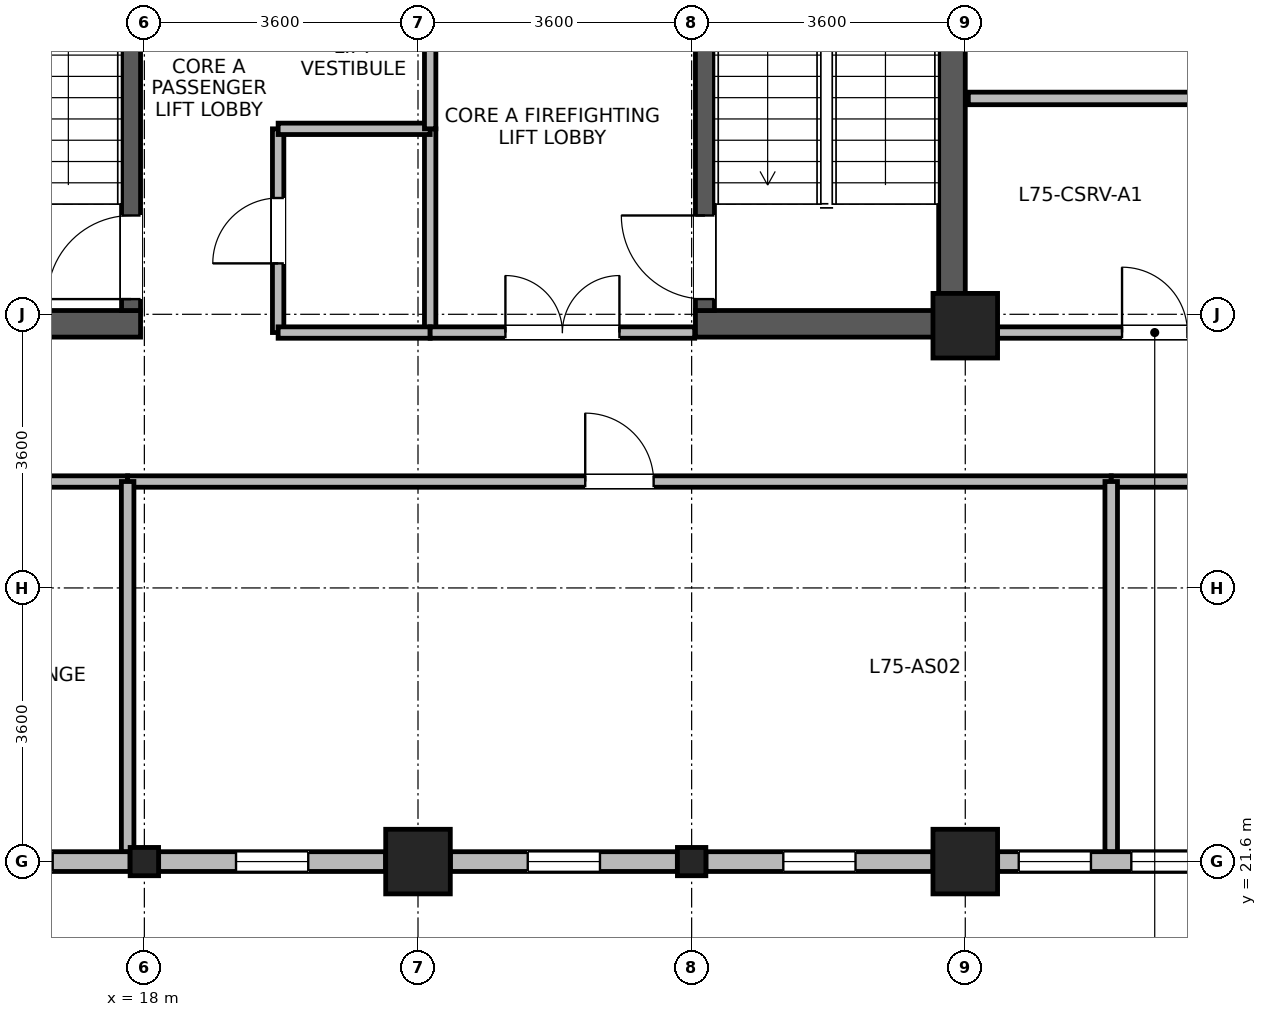
"""IFC4 building model, lengths in metres.
Left out: names, types, materials, properties, quantities, classifications, styles, units other than length and angle.
Written with IfcOpenShell. Run it as: python <this file> out.ifc"""

import sys

from ifc_helpers import new_model, si_unit, direction, frame, frame_2d, origin, origin_2d, place, context, subcontext, project, spatial, rectangle, i_section, extrude, source, transform, mapped, element, fill, save


model = new_model("IFC4")
c1 = context("Model", 3, precision=1e-05, world=origin(), true_north=direction((0.0, 1.0)))
c2 = subcontext(c1, "Body", "Model", "MODEL_VIEW")
j1 = project(units=[si_unit("LENGTHUNIT", "METRE"), si_unit("PLANEANGLEUNIT", "RADIAN")], contexts=[c1])
p1 = place(None, origin())
s1 = spatial("IfcSite", under=j1, at=p1, CompositionType="ELEMENT")
p2 = place(p1, origin())
s2 = spatial("IfcBuilding", under=s1, at=p2, CompositionType="ELEMENT")
p3 = place(p2, frame((0.0, 0.0, 290.6)))
s3 = spatial("IfcBuildingStorey", under=s2, at=p3, CompositionType="ELEMENT", Elevation=290.6)
p4 = place(p3, frame((28.625, 28.5, 0.0), z_axis=(0.0, 0.0, 1.0), x_axis=(0.0, 1.0, 0.0)))
e1 = element("IfcWall", 1, at=p4, inside=s3, PredefinedType="SHEAR", context=c2, shape_type="SweptSolid", body=[
    extrude(rectangle(XDim=7.7, YDim=0.35, at=frame_2d((3.85, 0.0))), origin(), (0.0, 0.0, 1.0), 3.475),
])
for number, where, z_axis, x_axis in (
    (2, (14.75, 28.675, 0.0), (0.0, 0.0, 1.0), (1.0, 0.0, 0.0)),
    (3, (25.25, 28.675, 0.0), (0.0, 0.0, 1.0), (1.0, 0.0, 0.0)),
):
    element("IfcWall", number, at=place(p3, frame(where, z_axis=z_axis, x_axis=x_axis)), inside=s3, PredefinedType="SHEAR", context=c2, shape_type="SweptSolid", body=[
        extrude(rectangle(XDim=3.2, YDim=0.35, at=frame_2d((1.6, 0.0))), origin(), (0.0, 0.0, 1.0), 3.475),
    ])
p5 = place(p3, frame((17.825, 28.85, 0.0), z_axis=(0.0, 0.0, 1.0), x_axis=(0.0, 1.0, 0.0)))
e4 = element("IfcWall", 4, at=p5, inside=s3, PredefinedType="SHEAR", context=c2, shape_type="SweptSolid", body=[
    extrude(rectangle(XDim=7.0, YDim=0.25, at=frame_2d((3.5, 0.0))), origin(), (0.0, 0.0, 1.0), 3.475),
])
p6 = place(p5, frame((0.15, 0.0, 0.0)))
e5 = element("IfcOpeningElement", 5, at=p6, cuts=e4, PredefinedType="OPENING", context=c2, shape_type="SweptSolid", body=[
    extrude(rectangle(XDim=1.1, YDim=2.08, at=frame_2d((0.55, 1.04))), frame((0.0, 0.135, 0.0), z_axis=(0.0, -1.0, 0.0), x_axis=(1.0, 0.0, 0.0)), (0.0, 0.0, 1.0), 0.27),
])
p7 = place(p3, frame((25.375, 28.85, 0.0), z_axis=(0.0, 0.0, 1.0), x_axis=(0.0, 1.0, 0.0)))
e6 = element("IfcWall", 6, at=p7, inside=s3, PredefinedType="SHEAR", context=c2, shape_type="SweptSolid", body=[
    extrude(rectangle(XDim=7.0, YDim=0.25, at=frame_2d((3.5, 0.0))), origin(), (0.0, 0.0, 1.0), 3.475),
])
p8 = place(p7, frame((0.15, 0.0, 0.0)))
e7 = element("IfcOpeningElement", 7, at=p8, cuts=e6, PredefinedType="OPENING", context=c2, shape_type="SweptSolid", body=[
    extrude(rectangle(XDim=1.1, YDim=2.08, at=frame_2d((0.55, 1.04))), frame((0.0, 0.135, 0.0), z_axis=(0.0, -1.0, 0.0), x_axis=(1.0, 0.0, 0.0)), (0.0, 0.0, 1.0), 0.27),
])
m1 = source(origin(), c2, "Body", "SweptSolid", [
    extrude(rectangle(XDim=0.85, YDim=0.85, at=origin_2d()), origin(), (0.0, 0.0, 1.0), 3.7),
])
for number, where, z_axis, x_axis in (
    (8, (21.6, 21.6, 0.0), (0.0, 0.0, 1.0), (1.0, 0.0, 0.0)),
    (9, (28.8, 21.6, 0.0), (0.0, 0.0, 1.0), (1.0, 0.0, 0.0)),
    (10, (28.8, 28.65, 0.0), (0.0, 0.0, 1.0), (1.0, 0.0, 0.0)),
):
    element("IfcColumn", number, at=place(p3, frame(where, z_axis=z_axis, x_axis=x_axis)), inside=s3, PredefinedType="COLUMN", context=c2, shape_type="MappedRepresentation", body=[
        mapped(m1, transform((0.0, 0.0, 0.0), x_axis=(1.0, 0.0, 0.0), y_axis=(0.0, 1.0, 0.0), z_axis=(0.0, 0.0, 1.0), scale=1.0)),
    ])
m2 = source(origin(), c2, "Body", "SweptSolid", [
    extrude(i_section(OverallWidth=0.374, OverallDepth=0.372, WebThickness=0.015, FlangeThickness=0.026, FilletRadius=0.015, at=origin_2d()), origin(), (0.0, 0.0, 1.0), 3.7),
])
for number, where, z_axis, x_axis in (
    (11, (18.0, 21.6, 0.0), (0.0, 0.0, 1.0), (1.0, 0.0, 0.0)),
    (12, (25.2, 21.6, 0.0), (0.0, 0.0, 1.0), (1.0, 0.0, 0.0)),
):
    element("IfcColumn", number, at=place(p3, frame(where, z_axis=z_axis, x_axis=x_axis)), inside=s3, PredefinedType="COLUMN", context=c2, shape_type="MappedRepresentation", body=[
        mapped(m2, transform((0.0, 0.0, 0.0), x_axis=(1.0, 0.0, 0.0), y_axis=(0.0, 1.0, 0.0), z_axis=(0.0, 0.0, 1.0), scale=1.0)),
    ])
p9 = place(p3, frame((17.812, 21.6, 0.0), z_axis=(0.0, 0.0, 1.0), x_axis=(-1.0, 0.0, 0.0)))
e13 = element("IfcWall", 13, at=p9, inside=s3, PredefinedType="STANDARD", context=c2, shape_type="SweptSolid", body=[
    extrude(rectangle(XDim=2.986, YDim=0.26, at=frame_2d((1.493, 0.0))), origin(), (0.0, 0.0, 1.0), 3.055),
])
p10 = place(p9, frame((1.018, 0.0, 0.85)))
e14 = element("IfcOpeningElement", 14, at=p10, cuts=e13, PredefinedType="OPENING", context=c2, shape_type="SweptSolid", body=[
    extrude(rectangle(XDim=0.95, YDim=1.75, at=frame_2d((0.475, 0.875))), frame((0.0, 0.14, 0.0), z_axis=(0.0, -1.0, 0.0), x_axis=(1.0, 0.0, 0.0)), (0.0, 0.0, 1.0), 0.28),
])
p11 = place(p3, frame((21.174, 21.6, 0.0), z_axis=(0.0, 0.0, 1.0), x_axis=(-1.0, 0.0, 0.0)))
e15 = element("IfcWall", 15, at=p11, inside=s3, PredefinedType="STANDARD", context=c2, shape_type="SweptSolid", body=[
    extrude(rectangle(XDim=2.986, YDim=0.26, at=frame_2d((1.493, 0.0))), origin(), (0.0, 0.0, 1.0), 3.055),
])
p12 = place(p11, frame((1.018, 0.0, 0.85)))
e16 = element("IfcOpeningElement", 16, at=p12, cuts=e15, PredefinedType="OPENING", context=c2, shape_type="SweptSolid", body=[
    extrude(rectangle(XDim=0.95, YDim=1.75, at=frame_2d((0.475, 0.875))), frame((0.0, 0.14, 0.0), z_axis=(0.0, -1.0, 0.0), x_axis=(1.0, 0.0, 0.0)), (0.0, 0.0, 1.0), 0.28),
])
p13 = place(p3, frame((25.012, 21.6, 0.0), z_axis=(0.0, 0.0, 1.0), x_axis=(-1.0, 0.0, 0.0)))
e17 = element("IfcWall", 17, at=p13, inside=s3, PredefinedType="STANDARD", context=c2, shape_type="SweptSolid", body=[
    extrude(rectangle(XDim=2.986, YDim=0.26, at=frame_2d((1.493, 0.0))), origin(), (0.0, 0.0, 1.0), 3.055),
])
p14 = place(p13, frame((1.018, 0.0, 0.85)))
e18 = element("IfcOpeningElement", 18, at=p14, cuts=e17, PredefinedType="OPENING", context=c2, shape_type="SweptSolid", body=[
    extrude(rectangle(XDim=0.95, YDim=1.75, at=frame_2d((0.475, 0.875))), frame((0.0, 0.14, 0.0), z_axis=(0.0, -1.0, 0.0), x_axis=(1.0, 0.0, 0.0)), (0.0, 0.0, 1.0), 0.28),
])
p15 = place(p3, frame((28.374, 21.6, 0.0), z_axis=(0.0, 0.0, 1.0), x_axis=(-1.0, 0.0, 0.0)))
e19 = element("IfcWall", 19, at=p15, inside=s3, PredefinedType="STANDARD", context=c2, shape_type="SweptSolid", body=[
    extrude(rectangle(XDim=2.986, YDim=0.26, at=frame_2d((1.493, 0.0))), origin(), (0.0, 0.0, 1.0), 3.055),
])
p16 = place(p15, frame((1.018, 0.0, 0.85)))
e20 = element("IfcOpeningElement", 20, at=p16, cuts=e19, PredefinedType="OPENING", context=c2, shape_type="SweptSolid", body=[
    extrude(rectangle(XDim=0.95, YDim=1.75, at=frame_2d((0.475, 0.875))), frame((0.0, 0.14, 0.0), z_axis=(0.0, -1.0, 0.0), x_axis=(1.0, 0.0, 0.0)), (0.0, 0.0, 1.0), 0.28),
])
p17 = place(p3, frame((32.212, 21.6, 0.0), z_axis=(0.0, 0.0, 1.0), x_axis=(-1.0, 0.0, 0.0)))
e21 = element("IfcWall", 21, at=p17, inside=s3, PredefinedType="STANDARD", context=c2, shape_type="SweptSolid", body=[
    extrude(rectangle(XDim=2.986, YDim=0.26, at=frame_2d((1.493, 0.0))), origin(), (0.0, 0.0, 1.0), 3.055),
])
p18 = place(p17, frame((0.278, 0.0, 0.85)))
e22 = element("IfcOpeningElement", 22, at=p18, cuts=e21, PredefinedType="OPENING", context=c2, shape_type="SweptSolid", body=[
    extrude(rectangle(XDim=0.95, YDim=1.75, at=frame_2d((0.475, 0.875))), frame((0.0, 0.14, 0.0), z_axis=(0.0, -1.0, 0.0), x_axis=(1.0, 0.0, 0.0)), (0.0, 0.0, 1.0), 0.28),
])
p19 = place(p17, frame((1.759, 0.0, 0.85)))
e23 = element("IfcOpeningElement", 23, at=p19, cuts=e21, PredefinedType="OPENING", context=c2, shape_type="SweptSolid", body=[
    extrude(rectangle(XDim=0.95, YDim=1.75, at=frame_2d((0.475, 0.875))), frame((0.0, 0.14, 0.0), z_axis=(0.0, -1.0, 0.0), x_axis=(1.0, 0.0, 0.0)), (0.0, 0.0, 1.0), 0.28),
])
p20 = place(p3, frame((3.732, 26.6, 0.0), z_axis=(0.0, 0.0, 1.0), x_axis=(1.0, 0.0, 0.0)))
e24 = element("IfcWall", 24, at=p20, inside=s3, PredefinedType="PARTITIONING", context=c2, shape_type="SweptSolid", body=[
    extrude(rectangle(XDim=14.048, YDim=0.15, at=frame_2d((7.024, 0.0))), origin(), (0.0, 0.0, 1.0), 3.455),
])
p21 = place(p20, frame((6.374, 0.0, 0.0)))
e25 = element("IfcOpeningElement", 25, at=p21, cuts=e24, PredefinedType="OPENING", context=c2, shape_type="SweptSolid", body=[
    extrude(rectangle(XDim=1.3, YDim=2.12, at=frame_2d((0.65, 1.06))), frame((0.0, 0.085, 0.0), z_axis=(0.0, -1.0, 0.0), x_axis=(1.0, 0.0, 0.0)), (0.0, 0.0, 1.0), 0.17),
])
p22 = place(p3, frame((17.78, 26.6, 0.0), z_axis=(0.0, 0.0, 1.0), x_axis=(1.0, 0.0, 0.0)))
e26 = element("IfcWall", 26, at=p22, inside=s3, PredefinedType="PARTITIONING", context=c2, shape_type="SweptSolid", body=[
    extrude(rectangle(XDim=12.94, YDim=0.15, at=frame_2d((6.47, 0.0))), origin(), (0.0, 0.0, 1.0), 3.455),
])
p23 = place(p22, frame((6.02, 0.0, 0.0)))
e27 = element("IfcOpeningElement", 27, at=p23, cuts=e26, PredefinedType="OPENING", context=c2, shape_type="SweptSolid", body=[
    extrude(rectangle(XDim=0.9, YDim=2.08, at=frame_2d((0.45, 1.04))), frame((0.0, 0.085, 0.0), z_axis=(0.0, -1.0, 0.0), x_axis=(1.0, 0.0, 0.0)), (0.0, 0.0, 1.0), 0.17),
])
p24 = place(p3, frame((30.72, 26.6, 0.0), z_axis=(0.0, 0.0, 1.0), x_axis=(1.0, 0.0, 0.0)))
e28 = element("IfcWall", 28, at=p24, inside=s3, PredefinedType="PARTITIONING", context=c2, shape_type="SweptSolid", body=[
    extrude(rectangle(XDim=7.08, YDim=0.15, at=frame_2d((3.54, 0.0))), origin(), (0.0, 0.0, 1.0), 3.455),
])
p25 = place(p24, frame((3.065, 0.0, 0.0)))
e29 = element("IfcOpeningElement", 29, at=p25, cuts=e28, PredefinedType="OPENING", context=c2, shape_type="SweptSolid", body=[
    extrude(rectangle(XDim=0.95, YDim=2.1, at=frame_2d((0.475, 1.05))), frame((0.0, 0.085, 0.0), z_axis=(0.0, -1.0, 0.0), x_axis=(1.0, 0.0, 0.0)), (0.0, 0.0, 1.0), 0.17),
])
p26 = place(p3, frame((29.225, 28.56, 0.0), z_axis=(0.0, 0.0, 1.0), x_axis=(1.0, 0.0, 0.0)))
e30 = element("IfcWall", 30, at=p26, inside=s3, PredefinedType="PARTITIONING", context=c2, shape_type="SweptSolid", body=[
    extrude(rectangle(XDim=4.135, YDim=0.15, at=frame_2d((2.067, 0.0))), origin(), (0.0, 0.0, 1.0), 2.905),
])
p27 = place(p26, frame((1.637, 0.0, 0.0)))
e31 = element("IfcOpeningElement", 31, at=p27, cuts=e30, PredefinedType="OPENING", context=c2, shape_type="SweptSolid", body=[
    extrude(rectangle(XDim=0.86, YDim=2.02, at=frame_2d((0.43, 1.01))), frame((0.0, 0.085, 0.0), z_axis=(0.0, -1.0, 0.0), x_axis=(1.0, 0.0, 0.0)), (0.0, 0.0, 1.0), 0.17),
])
p28 = place(p3, frame((19.76, 28.56, 0.0), z_axis=(0.0, 0.0, 1.0), x_axis=(0.0, 1.0, 0.0)))
e32 = element("IfcWall", 32, at=p28, inside=s3, PredefinedType="PARTITIONING", context=c2, shape_type="SweptSolid", body=[
    extrude(rectangle(XDim=2.68, YDim=0.15, at=frame_2d((1.34, 0.0))), origin(), (0.0, 0.0, 1.0), 3.455),
])
p29 = place(p28, frame((0.91, 0.0, 0.0)))
e33 = element("IfcOpeningElement", 33, at=p29, cuts=e32, PredefinedType="OPENING", context=c2, shape_type="SweptSolid", body=[
    extrude(rectangle(XDim=0.86, YDim=2.02, at=frame_2d((0.43, 1.01))), frame((0.0, 0.085, 0.0), z_axis=(0.0, -1.0, 0.0), x_axis=(1.0, 0.0, 0.0)), (0.0, 0.0, 1.0), 0.17),
])
p30 = place(p3, frame((21.76, 28.56, 0.0), z_axis=(0.0, 0.0, 1.0), x_axis=(0.0, 1.0, 0.0)))
e34 = element("IfcWall", 34, at=p30, inside=s3, PredefinedType="PARTITIONING", context=c2, shape_type="SweptSolid", body=[
    extrude(rectangle(XDim=2.68, YDim=0.15, at=frame_2d((1.34, 0.0))), origin(), (0.0, 0.0, 1.0), 3.455),
])
p31 = place(p3, frame((19.76, 28.56, 0.0), z_axis=(0.0, 0.0, 1.0), x_axis=(1.0, 0.0, 0.0)))
e35 = element("IfcWall", 35, at=p31, inside=s3, PredefinedType="PARTITIONING", context=c2, shape_type="SweptSolid", body=[
    extrude(rectangle(XDim=2.0, YDim=0.15, at=frame_2d((1.0, 0.0))), origin(), (0.0, 0.0, 1.0), 2.555),
])
p32 = place(p3, frame((19.76, 31.24, 0.0), z_axis=(0.0, 0.0, 1.0), x_axis=(1.0, 0.0, 0.0)))
e36 = element("IfcWall", 36, at=p32, inside=s3, PredefinedType="PARTITIONING", context=c2, shape_type="SweptSolid", body=[
    extrude(rectangle(XDim=2.0, YDim=0.15, at=frame_2d((1.0, 0.0))), origin(), (0.0, 0.0, 1.0), 3.455),
])
for number, where, z_axis, x_axis in (
    (37, (17.78, 21.732, 0.0), (0.0, 0.0, 1.0), (0.0, 1.0, 0.0)),
    (38, (30.72, 21.732, 0.0), (0.0, 0.0, 1.0), (0.0, 1.0, 0.0)),
):
    element("IfcWall", number, at=place(p3, frame(where, z_axis=z_axis, x_axis=x_axis)), inside=s3, PredefinedType="PARTITIONING", context=c2, shape_type="SweptSolid", body=[
        extrude(rectangle(XDim=4.868, YDim=0.165, at=frame_2d((2.434, 0.0))), origin(), (0.0, 0.0, 1.0), 3.455),
    ])
p33 = place(p3, frame((28.84, 31.64, 0.0), z_axis=(0.0, 0.0, 1.0), x_axis=(1.0, 0.0, 0.0)))
e39 = element("IfcWall", 39, at=p33, inside=s3, PredefinedType="PARTITIONING", context=c2, shape_type="SweptSolid", body=[
    extrude(rectangle(XDim=4.52, YDim=0.165, at=frame_2d((2.26, 0.0))), origin(), (0.0, 0.0, 1.0), 3.455),
])
p34 = place(p3, frame((21.76, 28.56, 0.0), z_axis=(0.0, 0.0, 1.0), x_axis=(1.0, 0.0, 0.0)))
e40 = element("IfcWall", 40, at=p34, inside=s3, PredefinedType="PARTITIONING", context=c2, shape_type="SweptSolid", body=[
    extrude(rectangle(XDim=3.48, YDim=0.15, at=frame_2d((1.74, 0.0))), origin(), (0.0, 0.0, 1.0), 2.555),
])
p35 = place(p34, frame((0.99, 0.0, 0.0)))
e41 = element("IfcOpeningElement", 41, at=p35, cuts=e40, PredefinedType="OPENING", context=c2, shape_type="SweptSolid", body=[
    extrude(rectangle(XDim=1.5, YDim=2.1, at=frame_2d((0.75, 1.05))), frame((0.0, 0.085, 0.0), z_axis=(0.0, -1.0, 0.0), x_axis=(1.0, 0.0, 0.0)), (0.0, 0.0, 1.0), 0.17),
])
p36 = place(p3, frame((21.76, 31.24, 0.0), z_axis=(0.0, 0.0, 1.0), x_axis=(0.0, 1.0, 0.0)))
e42 = element("IfcWall", 42, at=p36, inside=s3, PredefinedType="PARTITIONING", context=c2, shape_type="SweptSolid", body=[
    extrude(rectangle(XDim=1.92, YDim=0.15, at=frame_2d((0.96, 0.0))), origin(), (0.0, 0.0, 1.0), 3.455),
])
p37 = place(p10, origin())
e43 = element("IfcWindow", 43, at=p37, inside=s3, PartitioningType="SINGLE_PANEL", PredefinedType="WINDOW", context=c2, shape_type="SweptSolid", body=[
    extrude(rectangle(XDim=0.95, YDim=1.75, at=frame_2d((0.475, 0.875))), frame((0.0, 0.03, 0.0), z_axis=(0.0, -1.0, 0.0), x_axis=(1.0, 0.0, 0.0)), (0.0, 0.0, 1.0), 0.06),
])
fill(e14, e43)
p38 = place(p12, origin())
e44 = element("IfcWindow", 44, at=p38, inside=s3, PartitioningType="SINGLE_PANEL", PredefinedType="WINDOW", context=c2, shape_type="SweptSolid", body=[
    extrude(rectangle(XDim=0.95, YDim=1.75, at=frame_2d((0.475, 0.875))), frame((0.0, 0.03, 0.0), z_axis=(0.0, -1.0, 0.0), x_axis=(1.0, 0.0, 0.0)), (0.0, 0.0, 1.0), 0.06),
])
fill(e16, e44)
p39 = place(p14, origin())
e45 = element("IfcWindow", 45, at=p39, inside=s3, PartitioningType="SINGLE_PANEL", PredefinedType="WINDOW", context=c2, shape_type="SweptSolid", body=[
    extrude(rectangle(XDim=0.95, YDim=1.75, at=frame_2d((0.475, 0.875))), frame((0.0, 0.03, 0.0), z_axis=(0.0, -1.0, 0.0), x_axis=(1.0, 0.0, 0.0)), (0.0, 0.0, 1.0), 0.06),
])
fill(e18, e45)
p40 = place(p16, origin())
e46 = element("IfcWindow", 46, at=p40, inside=s3, PartitioningType="SINGLE_PANEL", PredefinedType="WINDOW", context=c2, shape_type="SweptSolid", body=[
    extrude(rectangle(XDim=0.95, YDim=1.75, at=frame_2d((0.475, 0.875))), frame((0.0, 0.03, 0.0), z_axis=(0.0, -1.0, 0.0), x_axis=(1.0, 0.0, 0.0)), (0.0, 0.0, 1.0), 0.06),
])
fill(e20, e46)
p41 = place(p18, origin())
e47 = element("IfcWindow", 47, at=p41, inside=s3, PartitioningType="SINGLE_PANEL", PredefinedType="WINDOW", context=c2, shape_type="SweptSolid", body=[
    extrude(rectangle(XDim=0.95, YDim=1.75, at=frame_2d((0.475, 0.875))), frame((0.0, 0.03, 0.0), z_axis=(0.0, -1.0, 0.0), x_axis=(1.0, 0.0, 0.0)), (0.0, 0.0, 1.0), 0.06),
])
fill(e22, e47)
p42 = place(p19, origin())
e48 = element("IfcWindow", 48, at=p42, inside=s3, PartitioningType="SINGLE_PANEL", PredefinedType="WINDOW", context=c2, shape_type="SweptSolid", body=[
    extrude(rectangle(XDim=0.95, YDim=1.75, at=frame_2d((0.475, 0.875))), frame((0.0, 0.03, 0.0), z_axis=(0.0, -1.0, 0.0), x_axis=(1.0, 0.0, 0.0)), (0.0, 0.0, 1.0), 0.06),
])
fill(e23, e48)
p43 = place(p6, origin())
e49 = element("IfcDoor", 49, at=p43, inside=s3, OperationType="SINGLE_SWING_LEFT", PredefinedType="DOOR", context=c2, shape_type="SweptSolid", body=[
    extrude(rectangle(XDim=1.1, YDim=2.08, at=frame_2d((0.55, 1.04))), frame((0.0, 0.025, 0.0), z_axis=(0.0, -1.0, 0.0), x_axis=(1.0, 0.0, 0.0)), (0.0, 0.0, 1.0), 0.05),
])
fill(e5, e49)
p44 = place(p8, origin())
e50 = element("IfcDoor", 50, at=p44, inside=s3, OperationType="SINGLE_SWING_RIGHT", PredefinedType="DOOR", context=c2, shape_type="SweptSolid", body=[
    extrude(rectangle(XDim=1.1, YDim=2.08, at=frame_2d((0.55, 1.04))), frame((0.0, 0.025, 0.0), z_axis=(0.0, -1.0, 0.0), x_axis=(1.0, 0.0, 0.0)), (0.0, 0.0, 1.0), 0.05),
])
fill(e7, e50)
p45 = place(p23, origin())
e51 = element("IfcDoor", 51, at=p45, inside=s3, OperationType="SINGLE_SWING_LEFT", PredefinedType="DOOR", context=c2, shape_type="SweptSolid", body=[
    extrude(rectangle(XDim=0.9, YDim=2.08, at=frame_2d((0.45, 1.04))), frame((0.0, 0.025, 0.0), z_axis=(0.0, -1.0, 0.0), x_axis=(1.0, 0.0, 0.0)), (0.0, 0.0, 1.0), 0.05),
])
fill(e27, e51)
p46 = place(p27, origin())
e52 = element("IfcDoor", 52, at=p46, inside=s3, OperationType="SINGLE_SWING_LEFT", PredefinedType="DOOR", context=c2, shape_type="SweptSolid", body=[
    extrude(rectangle(XDim=0.86, YDim=2.02, at=frame_2d((0.43, 1.01))), frame((0.0, 0.025, 0.0), z_axis=(0.0, -1.0, 0.0), x_axis=(1.0, 0.0, 0.0)), (0.0, 0.0, 1.0), 0.05),
])
fill(e31, e52)
p47 = place(p29, origin())
e53 = element("IfcDoor", 53, at=p47, inside=s3, OperationType="SINGLE_SWING_LEFT", PredefinedType="DOOR", context=c2, shape_type="SweptSolid", body=[
    extrude(rectangle(XDim=0.86, YDim=2.02, at=frame_2d((0.43, 1.01))), frame((0.0, 0.025, 0.0), z_axis=(0.0, -1.0, 0.0), x_axis=(1.0, 0.0, 0.0)), (0.0, 0.0, 1.0), 0.05),
])
fill(e33, e53)
p48 = place(p35, origin())
e54 = element("IfcDoor", 54, at=p48, inside=s3, OperationType="DOUBLE_DOOR_SINGLE_SWING", PredefinedType="DOOR", context=c2, shape_type="SweptSolid", body=[
    extrude(rectangle(XDim=1.5, YDim=2.1, at=frame_2d((0.75, 1.05))), frame((0.0, 0.025, 0.0), z_axis=(0.0, -1.0, 0.0), x_axis=(1.0, 0.0, 0.0)), (0.0, 0.0, 1.0), 0.05),
])
fill(e41, e54)
save(model, sys.argv[1])
